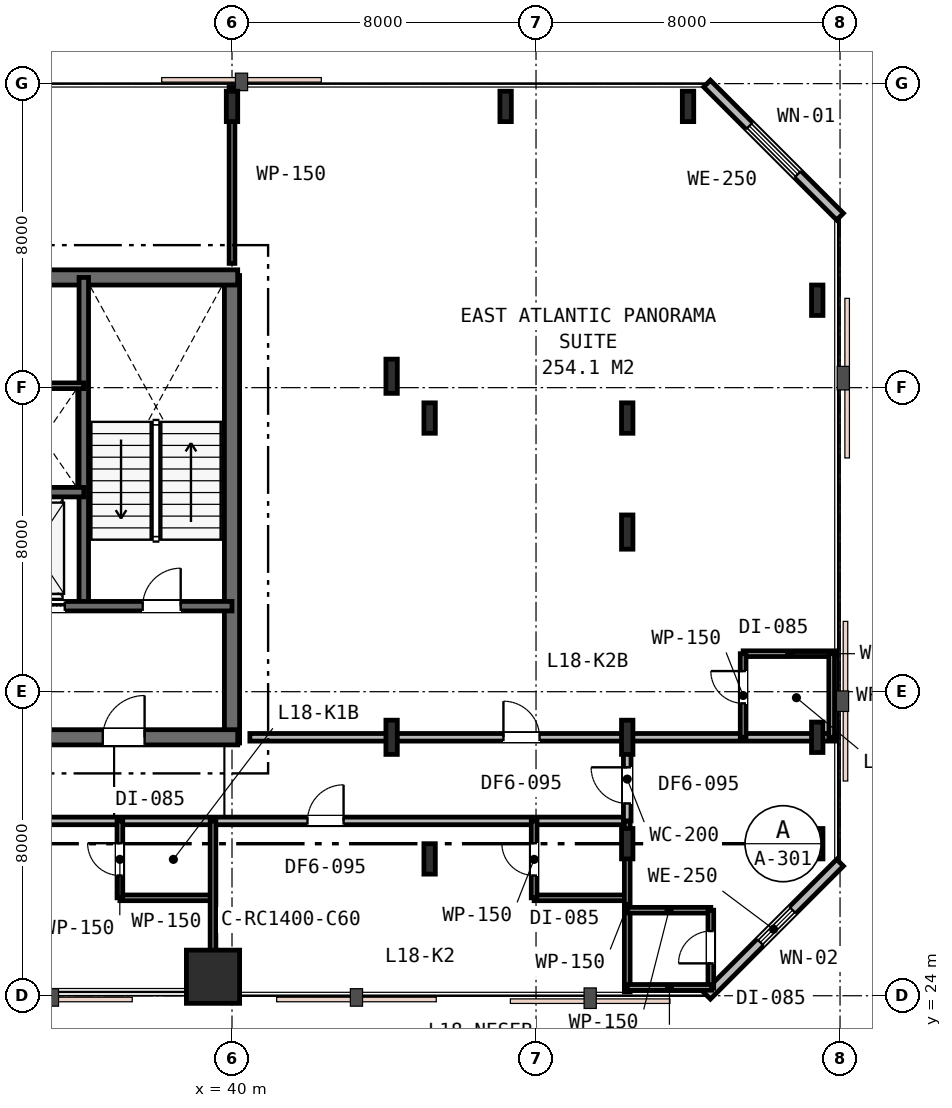
"""IFC4 building model, lengths in metres.
Left out: names, types, materials, properties, quantities, classifications, styles, units other than length and angle.
Written with IfcOpenShell. Run it as: python <this file> out.ifc"""

import sys

from ifc_helpers import new_model, si_unit, direction, frame, frame_2d, origin, origin_2d, place, context, subcontext, project, spatial, rectangle, i_section, extrude, element, fill, save


model = new_model("IFC4")
c1 = context("Model", 3, precision=1e-05, world=origin(), true_north=direction((0.0, 1.0)))
c2 = subcontext(c1, "Body", "Model", "MODEL_VIEW")
j1 = project(units=[si_unit("LENGTHUNIT", "METRE"), si_unit("PLANEANGLEUNIT", "RADIAN")], contexts=[c1])
p1 = place(None, origin())
s1 = spatial("IfcSite", under=j1, at=p1, CompositionType="ELEMENT")
p2 = place(p1, origin())
s2 = spatial("IfcBuilding", under=s1, at=p2, CompositionType="ELEMENT")
p3 = place(p2, frame((0.0, 0.0, 72.6)))
s3 = spatial("IfcBuildingStorey", under=s2, at=p3, CompositionType="ELEMENT", Elevation=72.6)
p4 = place(p3, frame((40.0, 30.65, 0.0), z_axis=(0.0, 0.0, 1.0), x_axis=(0.0, 1.0, 0.0)))
e1 = element("IfcWall", 1, at=p4, inside=s3, PredefinedType="SHEAR", context=c2, shape_type="SweptSolid", body=[
    extrude(rectangle(XDim=12.3, YDim=0.4, at=frame_2d((6.15, 0.0))), origin(), (0.0, 0.0, 1.0), 3.6),
])
p5 = place(p3, frame((15.85, 42.9, 0.0), z_axis=(0.0, 0.0, 1.0), x_axis=(1.0, 0.0, 0.0)))
e2 = element("IfcWall", 2, at=p5, inside=s3, PredefinedType="SHEAR", context=c2, shape_type="SweptSolid", body=[
    extrude(rectangle(XDim=24.3, YDim=0.4, at=frame_2d((12.15, 0.0))), origin(), (0.0, 0.0, 1.0), 3.6),
])
p6 = place(p3, frame((28.95, 30.8, 0.0), z_axis=(0.0, 0.0, 1.0), x_axis=(1.0, 0.0, 0.0)))
e3 = element("IfcWall", 3, at=p6, inside=s3, PredefinedType="SHEAR", context=c2, shape_type="SweptSolid", body=[
    extrude(rectangle(XDim=11.2, YDim=0.4, at=frame_2d((5.6, 0.0))), origin(), (0.0, 0.0, 1.0), 3.6),
])
p7 = place(p6, frame((7.65, 0.0, 0.0)))
e4 = element("IfcOpeningElement", 4, at=p7, cuts=e3, PredefinedType="OPENING", context=c2, shape_type="SweptSolid", body=[
    extrude(rectangle(XDim=1.1, YDim=2.15, at=frame_2d((0.55, 1.075))), frame((0.0, 0.21, 0.0), z_axis=(0.0, -1.0, 0.0), x_axis=(1.0, 0.0, 0.0)), (0.0, 0.0, 1.0), 0.42),
])
p8 = place(p3, frame((36.1, 34.25, 0.0), z_axis=(0.0, 0.0, 1.0), x_axis=(0.0, 1.0, 0.0)))
e5 = element("IfcWall", 5, at=p8, inside=s3, PredefinedType="SHEAR", context=c2, shape_type="SweptSolid", body=[
    extrude(rectangle(XDim=8.65, YDim=0.25, at=frame_2d((4.325, 0.0))), origin(), (0.0, 0.0, 1.0), 3.6),
])
p9 = place(p3, frame((33.95, 34.25, 0.0), z_axis=(0.0, 0.0, 1.0), x_axis=(1.0, 0.0, 0.0)))
e6 = element("IfcWall", 6, at=p9, inside=s3, PredefinedType="SHEAR", context=c2, shape_type="SweptSolid", body=[
    extrude(rectangle(XDim=6.05, YDim=0.25, at=frame_2d((3.025, 0.0))), origin(), (0.0, 0.0, 1.0), 3.6),
])
p10 = place(p9, frame((3.7, 0.0, 0.0)))
e7 = element("IfcOpeningElement", 7, at=p10, cuts=e6, PredefinedType="OPENING", context=c2, shape_type="SweptSolid", body=[
    extrude(rectangle(XDim=1.0, YDim=2.15, at=frame_2d((0.5, 1.075))), frame((0.0, 0.135, 0.0), z_axis=(0.0, -1.0, 0.0), x_axis=(1.0, 0.0, 0.0)), (0.0, 0.0, 1.0), 0.27),
])
p11 = place(p9, frame((0.55, 0.0, 0.0)))
e8 = element("IfcOpeningElement", 8, at=p11, cuts=e6, PredefinedType="OPENING", context=c2, shape_type="SweptSolid", body=[
    extrude(rectangle(XDim=1.1, YDim=2.15, at=frame_2d((0.55, 1.075))), frame((0.0, 0.135, 0.0), z_axis=(0.0, -1.0, 0.0), x_axis=(1.0, 0.0, 0.0)), (0.0, 0.0, 1.0), 0.27),
])
p12 = place(p3, frame((19.9, 37.25, 0.0), z_axis=(0.0, 0.0, 1.0), x_axis=(1.0, 0.0, 0.0)))
e9 = element("IfcWall", 9, at=p12, inside=s3, PredefinedType="SHEAR", context=c2, shape_type="SweptSolid", body=[
    extrude(rectangle(XDim=16.2, YDim=0.25, at=frame_2d((8.1, 0.0))), origin(), (0.0, 0.0, 1.0), 3.6),
])
p13 = place(p12, frame((12.55, 0.0, 0.0)))
e10 = element("IfcOpeningElement", 10, at=p13, cuts=e9, PredefinedType="OPENING", context=c2, shape_type="SweptSolid", body=[
    extrude(rectangle(XDim=0.9, YDim=2.15, at=frame_2d((0.45, 1.075))), frame((0.0, 0.135, 0.0), z_axis=(0.0, -1.0, 0.0), x_axis=(1.0, 0.0, 0.0)), (0.0, 0.0, 1.0), 0.27),
])
p14 = place(p3, frame((39.5, 24.5, 0.0), z_axis=(0.0, 0.0, 1.0), x_axis=(1.0, 0.0, 0.0)))
e11 = element("IfcColumn", 11, at=p14, inside=s3, PredefinedType="COLUMN", context=c2, shape_type="SweptSolid", body=[
    extrude(rectangle(XDim=1.4, YDim=1.4, at=origin_2d()), origin(), (0.0, 0.0, 1.0), 3.6),
])
for number, where, z_axis, x_axis in (
    (12, (45.2, 27.6, 0.0), (0.0, 0.0, 1.0), (1.0, 0.0, 0.0)),
    (13, (45.2, 39.2, 0.0), (0.0, 0.0, 1.0), (1.0, 0.0, 0.0)),
    (14, (40.0, 47.4, 0.0), (0.0, 0.0, 1.0), (1.0, 0.0, 0.0)),
    (15, (47.2, 47.4, 0.0), (0.0, 0.0, 1.0), (1.0, 0.0, 0.0)),
    (16, (50.4, 28.0, 0.0), (0.0, 0.0, 1.0), (1.0, 0.0, 0.0)),
    (17, (50.4, 39.2, 0.0), (0.0, 0.0, 1.0), (1.0, 0.0, 0.0)),
    (18, (55.4, 28.0, 0.0), (0.0, 0.0, 1.0), (1.0, 0.0, 0.0)),
    (19, (55.4, 30.8, 0.0), (0.0, 0.0, 1.0), (1.0, 0.0, 0.0)),
    (20, (55.4, 42.3, 0.0), (0.0, 0.0, 1.0), (1.0, 0.0, 0.0)),
    (21, (52.0, 47.4, 0.0), (0.0, 0.0, 1.0), (1.0, 0.0, 0.0)),
):
    element("IfcColumn", number, at=place(p3, frame(where, z_axis=z_axis, x_axis=x_axis)), inside=s3, PredefinedType="COLUMN", context=c2, shape_type="SweptSolid", body=[
        extrude(i_section(OverallWidth=0.3, OverallDepth=0.8, WebThickness=0.018, FlangeThickness=0.033, FilletRadius=0.03, at=origin_2d()), origin(), (0.0, 0.0, 1.0), 3.6),
    ])
for number, where, z_axis, x_axis in (
    (22, (44.2, 30.8, 0.0), (0.0, 0.0, 1.0), (1.0, 0.0, 0.0)),
    (23, (44.2, 40.3, 0.0), (0.0, 0.0, 1.0), (1.0, 0.0, 0.0)),
    (24, (50.4, 30.8, 0.0), (0.0, 0.0, 1.0), (1.0, 0.0, 0.0)),
    (25, (50.4, 36.2, 0.0), (0.0, 0.0, 1.0), (1.0, 0.0, 0.0)),
):
    element("IfcColumn", number, at=place(p3, frame(where, z_axis=z_axis, x_axis=x_axis)), inside=s3, PredefinedType="COLUMN", context=c2, shape_type="SweptSolid", body=[
        extrude(i_section(OverallWidth=0.3, OverallDepth=0.9, WebThickness=0.018, FlangeThickness=0.035, FilletRadius=0.03, at=origin_2d()), origin(), (0.0, 0.0, 1.0), 3.6),
    ])
p15 = place(p3, frame((52.5, 24.0, 0.0), z_axis=(0.0, 0.0, 1.0), x_axis=(0.707106781187, 0.707106781187, 0.0)))
e26 = element("IfcWall", 26, at=p15, inside=s3, PredefinedType="STANDARD", context=c2, shape_type="SweptSolid", body=[
    extrude(rectangle(XDim=4.95, YDim=0.25, at=frame_2d((2.475, 0.0))), origin(), (0.0, 0.0, 1.0), 3.33),
])
p16 = place(p15, frame((1.985, 0.0, 0.85)))
e27 = element("IfcOpeningElement", 27, at=p16, cuts=e26, PredefinedType="OPENING", context=c2, shape_type="SweptSolid", body=[
    extrude(rectangle(XDim=1.2, YDim=1.6, at=frame_2d((0.6, 0.8))), frame((0.0, 0.135, 0.0), z_axis=(0.0, -1.0, 0.0), x_axis=(1.0, 0.0, 0.0)), (0.0, 0.0, 1.0), 0.27),
])
p17 = place(p3, frame((56.0, 44.5, 0.0), z_axis=(0.0, 0.0, 1.0), x_axis=(-0.707106781187, 0.707106781187, 0.0)))
e28 = element("IfcWall", 28, at=p17, inside=s3, PredefinedType="STANDARD", context=c2, shape_type="SweptSolid", body=[
    extrude(rectangle(XDim=4.95, YDim=0.25, at=frame_2d((2.475, 0.0))), origin(), (0.0, 0.0, 1.0), 3.33),
])
p18 = place(p17, frame((1.575, 0.0, 0.75)))
e29 = element("IfcOpeningElement", 29, at=p18, cuts=e28, PredefinedType="OPENING", context=c2, shape_type="SweptSolid", body=[
    extrude(rectangle(XDim=1.8, YDim=1.85, at=frame_2d((0.9, 0.925))), frame((0.0, 0.135, 0.0), z_axis=(0.0, -1.0, 0.0), x_axis=(1.0, 0.0, 0.0)), (0.0, 0.0, 1.0), 0.27),
])
p19 = place(p3, frame((34.05, 40.05, 0.0), z_axis=(0.0, 0.0, 1.0), x_axis=(1.0, 0.0, 0.0)))
e30 = element("IfcWall", 30, at=p19, inside=s3, PredefinedType="PARTITIONING", context=c2, shape_type="SweptSolid", body=[
    extrude(rectangle(XDim=2.05, YDim=0.15, at=frame_2d((1.025, 0.0))), origin(), (0.0, 0.0, 1.0), 3.33),
])
p20 = place(p3, frame((14.0, 28.6, 0.0), z_axis=(0.0, 0.0, 1.0), x_axis=(1.0, 0.0, 0.0)))
e31 = element("IfcWall", 31, at=p20, inside=s3, PredefinedType="PARTITIONING", context=c2, shape_type="SweptSolid", body=[
    extrude(rectangle(XDim=36.4, YDim=0.2, at=frame_2d((18.2, 0.0))), origin(), (0.0, 0.0, 1.0), 2.83),
])
p21 = place(p20, frame((15.475, 0.0, 0.0)))
e32 = element("IfcOpeningElement", 32, at=p21, cuts=e31, PredefinedType="OPENING", context=c2, shape_type="SweptSolid", body=[
    extrude(rectangle(XDim=0.95, YDim=2.15, at=frame_2d((0.475, 1.075))), frame((0.0, 0.11, 0.0), z_axis=(0.0, -1.0, 0.0), x_axis=(1.0, 0.0, 0.0)), (0.0, 0.0, 1.0), 0.22),
])
p22 = place(p20, frame((27.986, 0.0, 0.0)))
e33 = element("IfcOpeningElement", 33, at=p22, cuts=e31, PredefinedType="OPENING", context=c2, shape_type="SweptSolid", body=[
    extrude(rectangle(XDim=0.95, YDim=2.15, at=frame_2d((0.475, 1.075))), frame((0.0, 0.11, 0.0), z_axis=(0.0, -1.0, 0.0), x_axis=(1.0, 0.0, 0.0)), (0.0, 0.0, 1.0), 0.22),
])
p23 = place(p3, frame((40.0, 43.27, 0.0), z_axis=(0.0, 0.0, 1.0), x_axis=(0.0, 1.0, 0.0)))
e34 = element("IfcWall", 34, at=p23, inside=s3, PredefinedType="PARTITIONING", context=c2, shape_type="SweptSolid", body=[
    extrude(rectangle(XDim=4.63, YDim=0.15, at=frame_2d((2.315, 0.0))), origin(), (0.0, 0.0, 1.0), 2.92),
])
p24 = place(p3, frame((37.05, 26.576, 0.0), z_axis=(0.0, 0.0, 1.0), x_axis=(1.0, 0.0, 0.0)))
e35 = element("IfcWall", 35, at=p24, inside=s3, PredefinedType="PARTITIONING", context=c2, shape_type="SweptSolid", body=[
    extrude(rectangle(XDim=2.45, YDim=0.15, at=frame_2d((1.225, 0.0))), origin(), (0.0, 0.0, 1.0), 2.83),
])
p25 = place(p3, frame((37.05, 26.576, 0.0), z_axis=(0.0, 0.0, 1.0), x_axis=(0.0, 1.0, 0.0)))
e36 = element("IfcWall", 36, at=p25, inside=s3, PredefinedType="PARTITIONING", context=c2, shape_type="SweptSolid", body=[
    extrude(rectangle(XDim=2.024, YDim=0.15, at=frame_2d((1.012, 0.0))), origin(), (0.0, 0.0, 1.0), 3.02),
])
p26 = place(p25, frame((0.587, 0.0, 0.0)))
e37 = element("IfcOpeningElement", 37, at=p26, cuts=e36, PredefinedType="OPENING", context=c2, shape_type="SweptSolid", body=[
    extrude(rectangle(XDim=0.85, YDim=2.15, at=frame_2d((0.425, 1.075))), frame((0.0, 0.085, 0.0), z_axis=(0.0, -1.0, 0.0), x_axis=(1.0, 0.0, 0.0)), (0.0, 0.0, 1.0), 0.17),
])
p27 = place(p3, frame((39.5, 28.6, 0.0), z_axis=(0.0, 0.0, 1.0), x_axis=(0.0, -1.0, 0.0)))
e38 = element("IfcWall", 38, at=p27, inside=s3, PredefinedType="PARTITIONING", context=c2, shape_type="SweptSolid", body=[
    extrude(rectangle(XDim=4.5, YDim=0.15, at=frame_2d((2.25, 0.0))), origin(), (0.0, 0.0, 1.0), 2.83),
])
p28 = place(p3, frame((47.95, 26.576, 0.0), z_axis=(0.0, 0.0, 1.0), x_axis=(1.0, 0.0, 0.0)))
e39 = element("IfcWall", 39, at=p28, inside=s3, PredefinedType="PARTITIONING", context=c2, shape_type="SweptSolid", body=[
    extrude(rectangle(XDim=2.45, YDim=0.15, at=frame_2d((1.225, 0.0))), origin(), (0.0, 0.0, 1.0), 3.33),
])
p29 = place(p3, frame((47.95, 26.576, 0.0), z_axis=(0.0, 0.0, 1.0), x_axis=(0.0, 1.0, 0.0)))
e40 = element("IfcWall", 40, at=p29, inside=s3, PredefinedType="PARTITIONING", context=c2, shape_type="SweptSolid", body=[
    extrude(rectangle(XDim=2.024, YDim=0.15, at=frame_2d((1.012, 0.0))), origin(), (0.0, 0.0, 1.0), 3.33),
])
p30 = place(p29, frame((0.587, 0.0, 0.0)))
e41 = element("IfcOpeningElement", 41, at=p30, cuts=e40, PredefinedType="OPENING", context=c2, shape_type="SweptSolid", body=[
    extrude(rectangle(XDim=0.85, YDim=2.15, at=frame_2d((0.425, 1.075))), frame((0.0, 0.085, 0.0), z_axis=(0.0, -1.0, 0.0), x_axis=(1.0, 0.0, 0.0)), (0.0, 0.0, 1.0), 0.17),
])
p31 = place(p3, frame((50.4, 28.6, 0.0), z_axis=(0.0, 0.0, 1.0), x_axis=(0.0, -1.0, 0.0)))
e42 = element("IfcWall", 42, at=p31, inside=s3, PredefinedType="PARTITIONING", context=c2, shape_type="SweptSolid", body=[
    extrude(rectangle(XDim=4.5, YDim=0.15, at=frame_2d((2.25, 0.0))), origin(), (0.0, 0.0, 1.0), 2.83),
])
p32 = place(p3, frame((40.47, 30.8, 0.0), z_axis=(0.0, 0.0, 1.0), x_axis=(1.0, 0.0, 0.0)))
e43 = element("IfcWall", 43, at=p32, inside=s3, PredefinedType="PARTITIONING", context=c2, shape_type="SweptSolid", body=[
    extrude(rectangle(XDim=15.43, YDim=0.2, at=frame_2d((7.715, 0.0))), origin(), (0.0, 0.0, 1.0), 2.83),
])
p33 = place(p32, frame((6.673, 0.0, 0.0)))
e44 = element("IfcOpeningElement", 44, at=p33, cuts=e43, PredefinedType="OPENING", context=c2, shape_type="SweptSolid", body=[
    extrude(rectangle(XDim=0.95, YDim=2.15, at=frame_2d((0.475, 1.075))), frame((0.0, 0.11, 0.0), z_axis=(0.0, -1.0, 0.0), x_axis=(1.0, 0.0, 0.0)), (0.0, 0.0, 1.0), 0.22),
])
p34 = place(p3, frame((53.45, 33.0, 0.0), z_axis=(0.0, 0.0, 1.0), x_axis=(1.0, 0.0, 0.0)))
e45 = element("IfcWall", 45, at=p34, inside=s3, PredefinedType="PARTITIONING", context=c2, shape_type="SweptSolid", body=[
    extrude(rectangle(XDim=2.45, YDim=0.15, at=frame_2d((1.225, 0.0))), origin(), (0.0, 0.0, 1.0), 2.92),
])
p35 = place(p3, frame((53.45, 30.8, 0.0), z_axis=(0.0, 0.0, 1.0), x_axis=(0.0, 1.0, 0.0)))
e46 = element("IfcWall", 46, at=p35, inside=s3, PredefinedType="PARTITIONING", context=c2, shape_type="SweptSolid", body=[
    extrude(rectangle(XDim=2.2, YDim=0.15, at=frame_2d((1.1, 0.0))), origin(), (0.0, 0.0, 1.0), 2.83),
])
p36 = place(p35, frame((0.892, 0.0, 0.0)))
e47 = element("IfcOpeningElement", 47, at=p36, cuts=e46, PredefinedType="OPENING", context=c2, shape_type="SweptSolid", body=[
    extrude(rectangle(XDim=0.85, YDim=2.15, at=frame_2d((0.425, 1.075))), frame((0.0, 0.085, 0.0), z_axis=(0.0, -1.0, 0.0), x_axis=(1.0, 0.0, 0.0)), (0.0, 0.0, 1.0), 0.17),
])
p37 = place(p3, frame((55.78, 33.0, 0.0), z_axis=(0.0, 0.0, 1.0), x_axis=(0.0, -1.0, 0.0)))
e48 = element("IfcWall", 48, at=p37, inside=s3, PredefinedType="PARTITIONING", context=c2, shape_type="SweptSolid", body=[
    extrude(rectangle(XDim=2.2, YDim=0.15, at=frame_2d((1.1, 0.0))), origin(), (0.0, 0.0, 1.0), 2.83),
])
p38 = place(p3, frame((50.4, 28.6, 0.0), z_axis=(0.0, 0.0, 1.0), x_axis=(0.0, 1.0, 0.0)))
e49 = element("IfcWall", 49, at=p38, inside=s3, PredefinedType="PARTITIONING", context=c2, shape_type="SweptSolid", body=[
    extrude(rectangle(XDim=2.2, YDim=0.2, at=frame_2d((1.1, 0.0))), origin(), (0.0, 0.0, 1.0), 2.83),
])
p39 = place(p38, frame((0.46, 0.0, 0.0)))
e50 = element("IfcOpeningElement", 50, at=p39, cuts=e49, PredefinedType="OPENING", context=c2, shape_type="SweptSolid", body=[
    extrude(rectangle(XDim=0.95, YDim=2.15, at=frame_2d((0.475, 1.075))), frame((0.0, 0.11, 0.0), z_axis=(0.0, -1.0, 0.0), x_axis=(1.0, 0.0, 0.0)), (0.0, 0.0, 1.0), 0.22),
])
p40 = place(p3, frame((50.4, 26.25, 0.0), z_axis=(0.0, 0.0, 1.0), x_axis=(1.0, 0.0, 0.0)))
e51 = element("IfcWall", 51, at=p40, inside=s3, PredefinedType="PARTITIONING", context=c2, shape_type="SweptSolid", body=[
    extrude(rectangle(XDim=2.2, YDim=0.15, at=frame_2d((1.1, 0.0))), origin(), (0.0, 0.0, 1.0), 3.33),
])
p41 = place(p3, frame((52.6, 24.2, 0.0), z_axis=(0.0, 0.0, 1.0), x_axis=(0.0, 1.0, 0.0)))
e52 = element("IfcWall", 52, at=p41, inside=s3, PredefinedType="PARTITIONING", context=c2, shape_type="SweptSolid", body=[
    extrude(rectangle(XDim=2.05, YDim=0.15, at=frame_2d((1.025, 0.0))), origin(), (0.0, 0.0, 1.0), 3.33),
])
p42 = place(p41, frame((0.651, 0.0, 0.0)))
e53 = element("IfcOpeningElement", 53, at=p42, cuts=e52, PredefinedType="OPENING", context=c2, shape_type="SweptSolid", body=[
    extrude(rectangle(XDim=0.85, YDim=2.15, at=frame_2d((0.425, 1.075))), frame((0.0, 0.085, 0.0), z_axis=(0.0, -1.0, 0.0), x_axis=(1.0, 0.0, 0.0)), (0.0, 0.0, 1.0), 0.17),
])
p43 = place(p3, frame((52.62, 24.22, 0.0), z_axis=(0.0, 0.0, 1.0), x_axis=(-1.0, 0.0, 0.0)))
e54 = element("IfcWall", 54, at=p43, inside=s3, PredefinedType="PARTITIONING", context=c2, shape_type="SweptSolid", body=[
    extrude(rectangle(XDim=2.22, YDim=0.15, at=frame_2d((1.11, 0.0))), origin(), (0.0, 0.0, 1.0), 3.33),
])
p44 = place(p16, origin())
e55 = element("IfcWindow", 55, at=p44, inside=s3, PartitioningType="SINGLE_PANEL", PredefinedType="WINDOW", context=c2, shape_type="SweptSolid", body=[
    extrude(rectangle(XDim=1.2, YDim=1.6, at=frame_2d((0.6, 0.8))), frame((0.0, 0.03, 0.0), z_axis=(0.0, -1.0, 0.0), x_axis=(1.0, 0.0, 0.0)), (0.0, 0.0, 1.0), 0.06),
])
fill(e27, e55)
p45 = place(p18, origin())
e56 = element("IfcWindow", 56, at=p45, inside=s3, PartitioningType="SINGLE_PANEL", PredefinedType="WINDOW", context=c2, shape_type="SweptSolid", body=[
    extrude(rectangle(XDim=1.8, YDim=1.85, at=frame_2d((0.9, 0.925))), frame((0.0, 0.03, 0.0), z_axis=(0.0, -1.0, 0.0), x_axis=(1.0, 0.0, 0.0)), (0.0, 0.0, 1.0), 0.06),
])
fill(e29, e56)
p46 = place(p10, origin())
e57 = element("IfcDoor", 57, at=p46, inside=s3, OperationType="SINGLE_SWING_RIGHT", PredefinedType="DOOR", context=c2, shape_type="SweptSolid", body=[
    extrude(rectangle(XDim=1.0, YDim=2.15, at=frame_2d((0.5, 1.075))), frame((0.0, 0.025, 0.0), z_axis=(0.0, -1.0, 0.0), x_axis=(1.0, 0.0, 0.0)), (0.0, 0.0, 1.0), 0.05),
])
fill(e7, e57)
p47 = place(p7, origin())
e58 = element("IfcDoor", 58, at=p47, inside=s3, OperationType="SINGLE_SWING_RIGHT", PredefinedType="DOOR", context=c2, shape_type="SweptSolid", body=[
    extrude(rectangle(XDim=1.1, YDim=2.15, at=frame_2d((0.55, 1.075))), frame((0.0, 0.025, 0.0), z_axis=(0.0, -1.0, 0.0), x_axis=(1.0, 0.0, 0.0)), (0.0, 0.0, 1.0), 0.05),
])
fill(e4, e58)
p48 = place(p26, origin())
e59 = element("IfcDoor", 59, at=p48, inside=s3, OperationType="SINGLE_SWING_RIGHT", PredefinedType="DOOR", context=c2, shape_type="SweptSolid", body=[
    extrude(rectangle(XDim=0.85, YDim=2.15, at=frame_2d((0.425, 1.075))), frame((0.0, 0.025, 0.0), z_axis=(0.0, -1.0, 0.0), x_axis=(1.0, 0.0, 0.0)), (0.0, 0.0, 1.0), 0.05),
])
fill(e37, e59)
p49 = place(p22, origin())
e60 = element("IfcDoor", 60, at=p49, inside=s3, OperationType="SINGLE_SWING_RIGHT", PredefinedType="DOOR", context=c2, shape_type="SweptSolid", body=[
    extrude(rectangle(XDim=0.95, YDim=2.15, at=frame_2d((0.475, 1.075))), frame((0.0, 0.025, 0.0), z_axis=(0.0, -1.0, 0.0), x_axis=(1.0, 0.0, 0.0)), (0.0, 0.0, 1.0), 0.05),
])
fill(e33, e60)
p50 = place(p30, origin())
e61 = element("IfcDoor", 61, at=p50, inside=s3, OperationType="SINGLE_SWING_RIGHT", PredefinedType="DOOR", context=c2, shape_type="SweptSolid", body=[
    extrude(rectangle(XDim=0.85, YDim=2.15, at=frame_2d((0.425, 1.075))), frame((0.0, 0.025, 0.0), z_axis=(0.0, -1.0, 0.0), x_axis=(1.0, 0.0, 0.0)), (0.0, 0.0, 1.0), 0.05),
])
fill(e41, e61)
p51 = place(p33, origin())
e62 = element("IfcDoor", 62, at=p51, inside=s3, OperationType="SINGLE_SWING_LEFT", PredefinedType="DOOR", context=c2, shape_type="SweptSolid", body=[
    extrude(rectangle(XDim=0.95, YDim=2.15, at=frame_2d((0.475, 1.075))), frame((0.0, 0.025, 0.0), z_axis=(0.0, -1.0, 0.0), x_axis=(1.0, 0.0, 0.0)), (0.0, 0.0, 1.0), 0.05),
])
fill(e44, e62)
p52 = place(p36, origin())
e63 = element("IfcDoor", 63, at=p52, inside=s3, OperationType="SINGLE_SWING_RIGHT", PredefinedType="DOOR", context=c2, shape_type="SweptSolid", body=[
    extrude(rectangle(XDim=0.85, YDim=2.15, at=frame_2d((0.425, 1.075))), frame((0.0, 0.025, 0.0), z_axis=(0.0, -1.0, 0.0), x_axis=(1.0, 0.0, 0.0)), (0.0, 0.0, 1.0), 0.05),
])
fill(e47, e63)
p53 = place(p39, origin())
e64 = element("IfcDoor", 64, at=p53, inside=s3, OperationType="SINGLE_SWING_RIGHT", PredefinedType="DOOR", context=c2, shape_type="SweptSolid", body=[
    extrude(rectangle(XDim=0.95, YDim=2.15, at=frame_2d((0.475, 1.075))), frame((0.0, 0.025, 0.0), z_axis=(0.0, -1.0, 0.0), x_axis=(1.0, 0.0, 0.0)), (0.0, 0.0, 1.0), 0.05),
])
fill(e50, e64)
p54 = place(p42, origin())
e65 = element("IfcDoor", 65, at=p54, inside=s3, OperationType="SINGLE_SWING_LEFT", PredefinedType="DOOR", context=c2, shape_type="SweptSolid", body=[
    extrude(rectangle(XDim=0.85, YDim=2.15, at=frame_2d((0.425, 1.075))), frame((0.0, 0.025, 0.0), z_axis=(0.0, -1.0, 0.0), x_axis=(1.0, 0.0, 0.0)), (0.0, 0.0, 1.0), 0.05),
])
fill(e53, e65)
p55 = place(p11, origin())
e66 = element("IfcDoor", 66, at=p55, inside=s3, OperationType="DOUBLE_DOOR_SLIDING", PredefinedType="DOOR", context=c2, shape_type="SweptSolid", body=[
    extrude(rectangle(XDim=1.1, YDim=2.15, at=frame_2d((0.55, 1.075))), frame((0.0, 0.025, 0.0), z_axis=(0.0, -1.0, 0.0), x_axis=(1.0, 0.0, 0.0)), (0.0, 0.0, 1.0), 0.05),
])
fill(e8, e66)
save(model, sys.argv[1])
